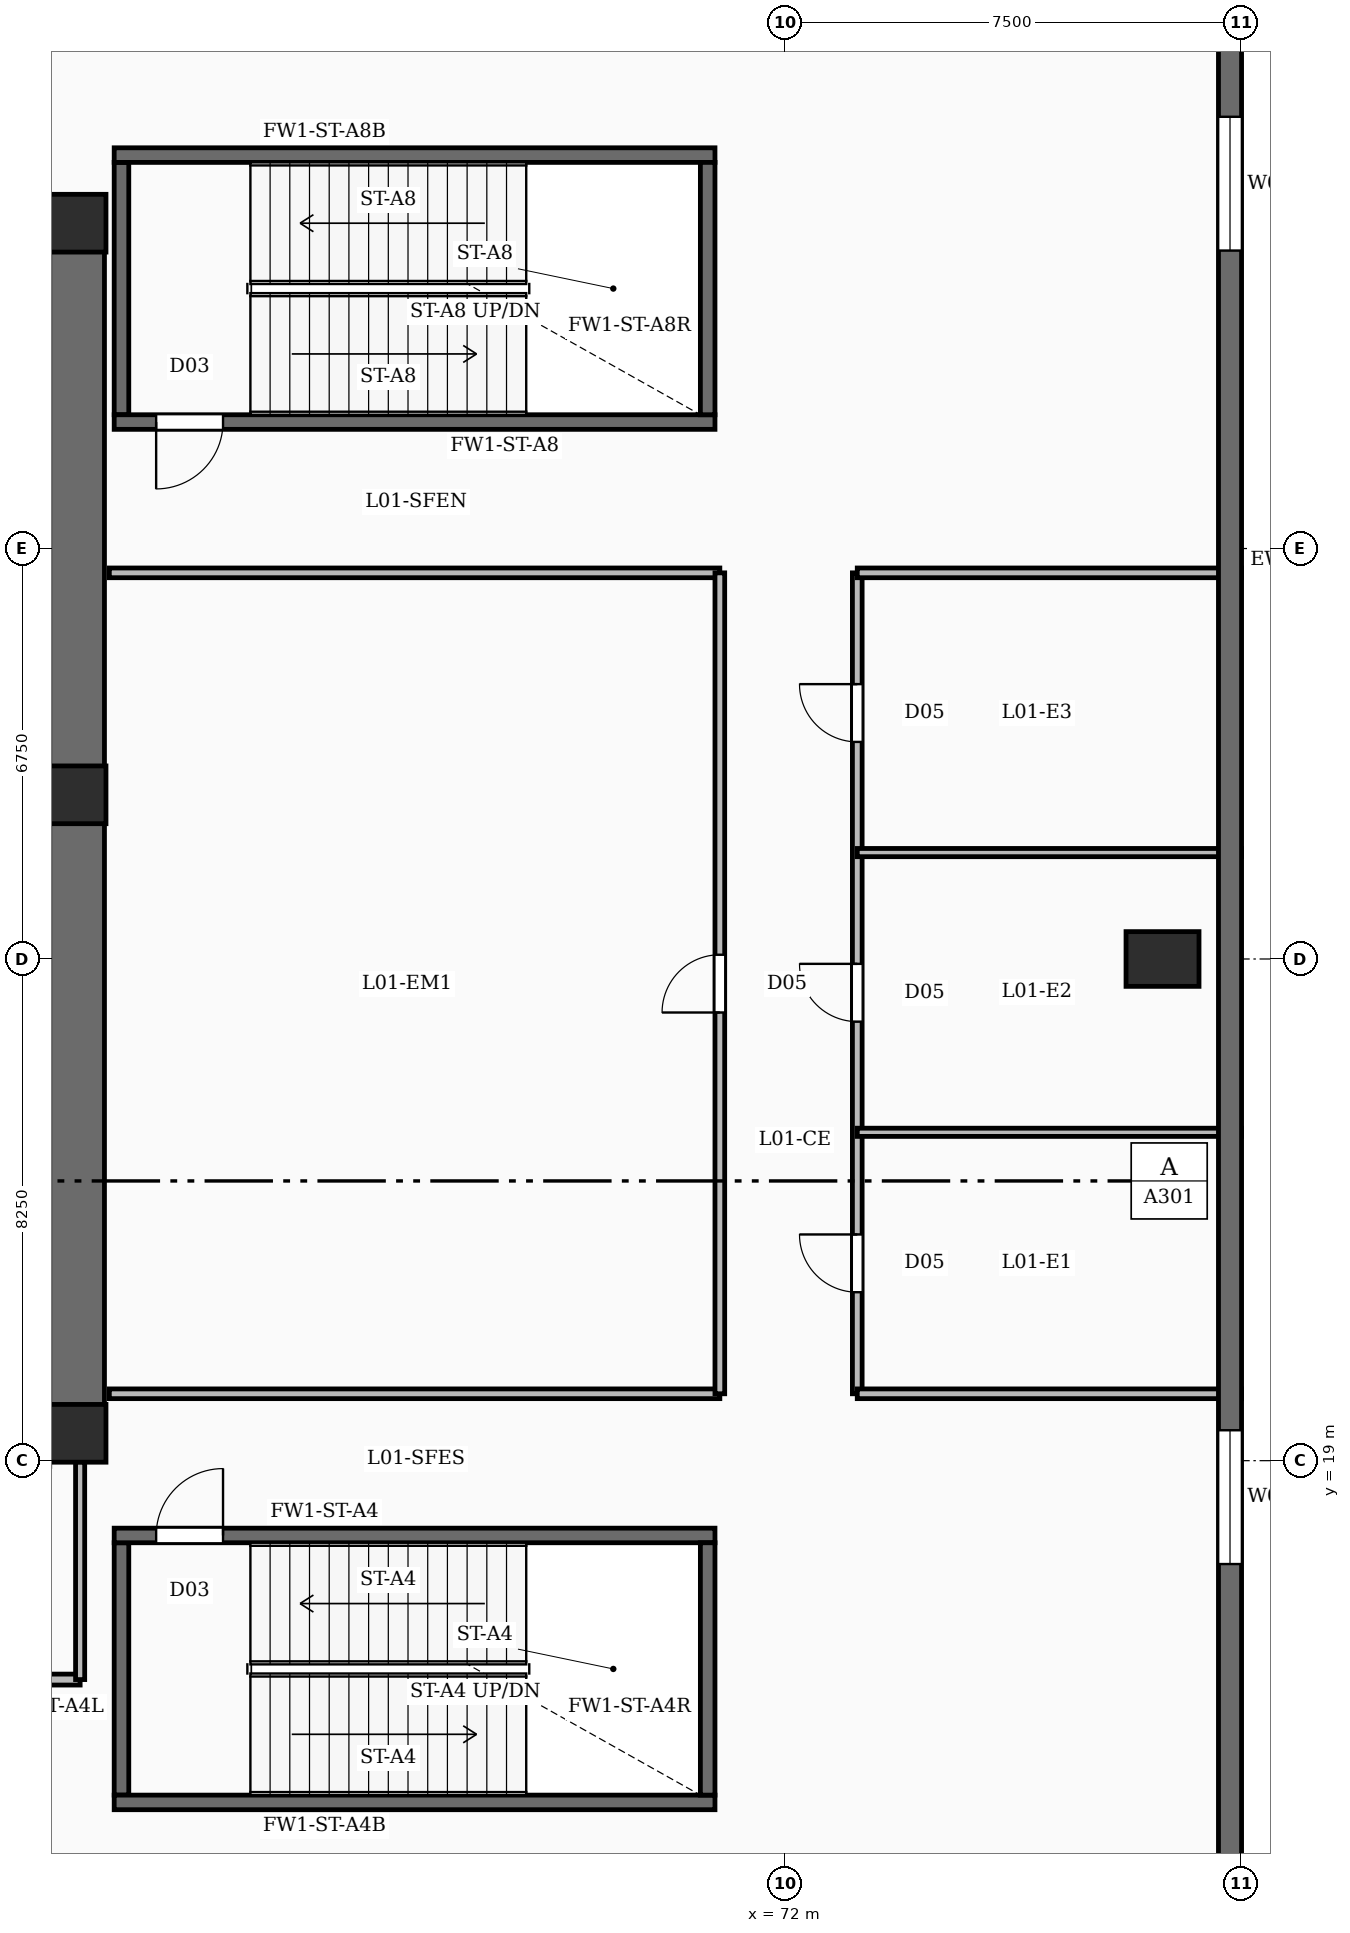
"""IFC4 building model, lengths in metres.
Left out: names, types, materials, properties, quantities, classifications, styles, units other than length and angle.
Written with IfcOpenShell. Run it as: python <this file> out.ifc"""

import sys

from ifc_helpers import new_model, si_unit, direction, frame, frame_2d, origin, origin_2d, place, context, subcontext, project, spatial, rectangle, extrude, element, fill, save


model = new_model("IFC4")
c1 = context("Model", 3, precision=1e-05, world=origin(), true_north=direction((0.0, 1.0)))
c2 = subcontext(c1, "Body", "Model", "MODEL_VIEW")
j1 = project(units=[si_unit("LENGTHUNIT", "METRE"), si_unit("PLANEANGLEUNIT", "RADIAN")], contexts=[c1])
p1 = place(None, origin())
s1 = spatial("IfcSite", under=j1, at=p1, CompositionType="ELEMENT")
p2 = place(p1, origin())
s2 = spatial("IfcBuilding", under=s1, at=p2, CompositionType="ELEMENT")
p3 = place(p2, frame((0.0, 0.0, 8.0)))
s3 = spatial("IfcBuildingStorey", under=s2, at=p3, CompositionType="ELEMENT", Elevation=8.0)
p4 = place(p3, frame((60.35, 19.0, -0.35), z_axis=(0.0, 0.0, 1.0), x_axis=(0.0, 1.0, 0.0)))
e1 = element("IfcWall", 1, at=p4, inside=s3, PredefinedType="SHEAR", context=c2, shape_type="SweptSolid", body=[
    extrude(rectangle(XDim=20.8, YDim=0.9, at=frame_2d((10.4, 0.0))), origin(), (0.0, 0.0, 1.0), 5.0),
])
for number, where, z_axis, x_axis in (
    (2, (60.35, 19.45, -0.35), (0.0, 0.0, 1.0), (1.0, 0.0, 0.0)),
    (3, (60.35, 29.95, -0.35), (0.0, 0.0, 1.0), (1.0, 0.0, 0.0)),
    (4, (60.35, 39.35, -0.35), (0.0, 0.0, 1.0), (1.0, 0.0, 0.0)),
):
    element("IfcColumn", number, at=place(p3, frame(where, z_axis=z_axis, x_axis=x_axis)), inside=s3, PredefinedType="COLUMN", context=c2, shape_type="SweptSolid", body=[
        extrude(rectangle(XDim=0.95, YDim=0.95, at=origin_2d()), origin(), (0.0, 0.0, 1.0), 5.0),
    ])
p5 = place(p3, frame((78.2, 27.25, -0.35), z_axis=(0.0, 0.0, 1.0), x_axis=(1.0, 0.0, 0.0)))
e5 = element("IfcColumn", 5, at=p5, inside=s3, PredefinedType="COLUMN", context=c2, shape_type="SweptSolid", body=[
    extrude(rectangle(XDim=1.2, YDim=0.9, at=origin_2d()), origin(), (0.0, 0.0, 1.0), 5.0),
])
p6 = place(p3, frame((79.31, 49.1, 0.0), z_axis=(0.0, 0.0, 1.0), x_axis=(0.0, -1.0, 0.0)))
e6 = element("IfcWall", 6, at=p6, inside=s3, PredefinedType="SOLIDWALL", context=c2, shape_type="SweptSolid", body=[
    extrude(rectangle(XDim=43.7, YDim=0.38, at=frame_2d((21.85, 0.0))), origin(), (0.0, 0.0, 1.0), 4.65),
])
p7 = place(p6, frame((2.6, 0.0, 0.95)))
e7 = element("IfcOpeningElement", 7, at=p7, cuts=e6, PredefinedType="OPENING", context=c2, shape_type="SweptSolid", body=[
    extrude(rectangle(XDim=2.2, YDim=2.5, at=frame_2d((1.1, 1.25))), frame((0.0, 0.2, 0.0), z_axis=(0.0, -1.0, 0.0), x_axis=(1.0, 0.0, 0.0)), (0.0, 0.0, 1.0), 0.4),
])
p8 = place(p6, frame((8.0, 0.0, 0.95)))
e8 = element("IfcOpeningElement", 8, at=p8, cuts=e6, PredefinedType="OPENING", context=c2, shape_type="SweptSolid", body=[
    extrude(rectangle(XDim=2.2, YDim=2.5, at=frame_2d((1.1, 1.25))), frame((0.0, 0.2, 0.0), z_axis=(0.0, -1.0, 0.0), x_axis=(1.0, 0.0, 0.0)), (0.0, 0.0, 1.0), 0.4),
])
p9 = place(p6, frame((29.6, 0.0, 0.95)))
e9 = element("IfcOpeningElement", 9, at=p9, cuts=e6, PredefinedType="OPENING", context=c2, shape_type="SweptSolid", body=[
    extrude(rectangle(XDim=2.2, YDim=2.5, at=frame_2d((1.1, 1.25))), frame((0.0, 0.2, 0.0), z_axis=(0.0, -1.0, 0.0), x_axis=(1.0, 0.0, 0.0)), (0.0, 0.0, 1.0), 0.4),
])
p10 = place(p3, frame((60.96, 17.77, 0.0), z_axis=(0.0, 0.0, 1.0), x_axis=(1.0, 0.0, 0.0)))
e10 = element("IfcWall", 10, at=p10, inside=s3, PredefinedType="SOLIDWALL", context=c2, shape_type="SweptSolid", body=[
    extrude(rectangle(XDim=9.88, YDim=0.24, at=frame_2d((4.94, 0.0))), origin(), (0.0, 0.0, 1.0), 4.65),
])
p11 = place(p10, frame((0.69, 0.0, 0.0)))
e11 = element("IfcOpeningElement", 11, at=p11, cuts=e10, PredefinedType="OPENING", context=c2, shape_type="SweptSolid", body=[
    extrude(rectangle(XDim=1.1, YDim=2.15, at=frame_2d((0.55, 1.075))), frame((0.0, 0.13, 0.0), z_axis=(0.0, -1.0, 0.0), x_axis=(1.0, 0.0, 0.0)), (0.0, 0.0, 1.0), 0.26),
])
p12 = place(p3, frame((60.96, 13.38, 0.0), z_axis=(0.0, 0.0, 1.0), x_axis=(1.0, 0.0, 0.0)))
e12 = element("IfcWall", 12, at=p12, inside=s3, PredefinedType="SOLIDWALL", context=c2, shape_type="SweptSolid", body=[
    extrude(rectangle(XDim=9.88, YDim=0.24, at=frame_2d((4.94, 0.0))), origin(), (0.0, 0.0, 1.0), 4.65),
])
for number, where, z_axis, x_axis in (
    (13, (61.08, 13.5, 0.0), (0.0, 0.0, 1.0), (0.0, 1.0, 0.0)),
    (14, (70.72, 13.5, 0.0), (0.0, 0.0, 1.0), (0.0, 1.0, 0.0)),
):
    element("IfcWall", number, at=place(p3, frame(where, z_axis=z_axis, x_axis=x_axis)), inside=s3, PredefinedType="SOLIDWALL", context=c2, shape_type="SweptSolid", body=[
        extrude(rectangle(XDim=4.15, YDim=0.24, at=frame_2d((2.075, 0.0))), origin(), (0.0, 0.0, 1.0), 4.65),
    ])
p13 = place(p3, frame((70.84, 36.08, 0.0), z_axis=(0.0, 0.0, 1.0), x_axis=(-1.0, 0.0, 0.0)))
e15 = element("IfcWall", 15, at=p13, inside=s3, PredefinedType="SOLIDWALL", context=c2, shape_type="SweptSolid", body=[
    extrude(rectangle(XDim=9.88, YDim=0.24, at=frame_2d((4.94, 0.0))), origin(), (0.0, 0.0, 1.0), 4.65),
])
p14 = place(p13, frame((8.09, 0.0, 0.0)))
e16 = element("IfcOpeningElement", 16, at=p14, cuts=e15, PredefinedType="OPENING", context=c2, shape_type="SweptSolid", body=[
    extrude(rectangle(XDim=1.1, YDim=2.15, at=frame_2d((0.55, 1.075))), frame((0.0, 0.13, 0.0), z_axis=(0.0, -1.0, 0.0), x_axis=(1.0, 0.0, 0.0)), (0.0, 0.0, 1.0), 0.26),
])
p15 = place(p3, frame((60.96, 40.47, 0.0), z_axis=(0.0, 0.0, 1.0), x_axis=(1.0, 0.0, 0.0)))
e17 = element("IfcWall", 17, at=p15, inside=s3, PredefinedType="SOLIDWALL", context=c2, shape_type="SweptSolid", body=[
    extrude(rectangle(XDim=9.88, YDim=0.24, at=frame_2d((4.94, 0.0))), origin(), (0.0, 0.0, 1.0), 4.65),
])
for number, where, z_axis, x_axis in (
    (18, (61.08, 36.2, 0.0), (0.0, 0.0, 1.0), (0.0, 1.0, 0.0)),
    (19, (70.72, 36.2, 0.0), (0.0, 0.0, 1.0), (0.0, 1.0, 0.0)),
):
    element("IfcWall", number, at=place(p3, frame(where, z_axis=z_axis, x_axis=x_axis)), inside=s3, PredefinedType="SOLIDWALL", context=c2, shape_type="SweptSolid", body=[
        extrude(rectangle(XDim=4.15, YDim=0.24, at=frame_2d((2.075, 0.0))), origin(), (0.0, 0.0, 1.0), 4.65),
    ])
p16 = place(p3, frame((50.4, 15.4, 0.0), z_axis=(0.0, 0.0, 1.0), x_axis=(1.0, 0.0, 0.0)))
e20 = element("IfcWall", 20, at=p16, inside=s3, PredefinedType="SOLIDWALL", context=c2, shape_type="SweptSolid", body=[
    extrude(rectangle(XDim=10.0, YDim=0.18, at=frame_2d((5.0, 0.0))), origin(), (0.0, 0.0, 1.0), 3.71),
])
p17 = place(p16, frame((1.94, 0.0, 0.0)))
e21 = element("IfcOpeningElement", 21, at=p17, cuts=e20, PredefinedType="OPENING", context=c2, shape_type="SweptSolid", body=[
    extrude(rectangle(XDim=0.92, YDim=2.1, at=frame_2d((0.46, 1.05))), frame((0.0, 0.1, 0.0), z_axis=(0.0, -1.0, 0.0), x_axis=(1.0, 0.0, 0.0)), (0.0, 0.0, 1.0), 0.2),
])
p18 = place(p16, frame((6.97, 0.0, 0.0)))
e22 = element("IfcOpeningElement", 22, at=p18, cuts=e20, PredefinedType="OPENING", context=c2, shape_type="SweptSolid", body=[
    extrude(rectangle(XDim=0.86, YDim=2.05, at=frame_2d((0.43, 1.025))), frame((0.0, 0.1, 0.0), z_axis=(0.0, -1.0, 0.0), x_axis=(1.0, 0.0, 0.0)), (0.0, 0.0, 1.0), 0.2),
])
p19 = place(p3, frame((60.4, 15.4, 0.0), z_axis=(0.0, 0.0, 1.0), x_axis=(0.0, 1.0, 0.0)))
e23 = element("IfcWall", 23, at=p19, inside=s3, PredefinedType="PARTITIONING", context=c2, shape_type="SweptSolid", body=[
    extrude(rectangle(XDim=3.58, YDim=0.15, at=frame_2d((1.79, 0.0))), origin(), (0.0, 0.0, 1.0), 3.71),
])
for number, where, z_axis, x_axis in (
    (24, (73.18, 24.4, 0.0), (0.0, 0.0, 1.0), (1.0, 0.0, 0.0)),
    (25, (73.18, 29.0, 0.0), (0.0, 0.0, 1.0), (1.0, 0.0, 0.0)),
):
    element("IfcWall", number, at=place(p3, frame(where, z_axis=z_axis, x_axis=x_axis)), inside=s3, PredefinedType="PARTITIONING", context=c2, shape_type="SweptSolid", body=[
        extrude(rectangle(XDim=6.32, YDim=0.135, at=frame_2d((3.16, 0.0))), origin(), (0.0, 0.0, 1.0), 3.71),
    ])
p20 = place(p3, frame((70.92, 20.1, 0.0), z_axis=(0.0, 0.0, 1.0), x_axis=(0.0, 1.0, 0.0)))
e26 = element("IfcWall", 26, at=p20, inside=s3, PredefinedType="PARTITIONING", context=c2, shape_type="SweptSolid", body=[
    extrude(rectangle(XDim=13.5, YDim=0.16, at=frame_2d((6.75, 0.0))), origin(), (0.0, 0.0, 1.0), 3.71),
])
p21 = place(p20, frame((6.27, 0.0, 0.0)))
e27 = element("IfcOpeningElement", 27, at=p21, cuts=e26, PredefinedType="OPENING", context=c2, shape_type="SweptSolid", body=[
    extrude(rectangle(XDim=0.95, YDim=2.15, at=frame_2d((0.475, 1.075))), frame((0.0, 0.09, 0.0), z_axis=(0.0, -1.0, 0.0), x_axis=(1.0, 0.0, 0.0)), (0.0, 0.0, 1.0), 0.18),
])
p22 = place(p3, frame((73.18, 20.1, 0.0), z_axis=(0.0, 0.0, 1.0), x_axis=(0.0, 1.0, 0.0)))
e28 = element("IfcWall", 28, at=p22, inside=s3, PredefinedType="PARTITIONING", context=c2, shape_type="SweptSolid", body=[
    extrude(rectangle(XDim=13.5, YDim=0.16, at=frame_2d((6.75, 0.0))), origin(), (0.0, 0.0, 1.0), 3.71),
])
p23 = place(p22, frame((1.67, 0.0, 0.0)))
e29 = element("IfcOpeningElement", 29, at=p23, cuts=e28, PredefinedType="OPENING", context=c2, shape_type="SweptSolid", body=[
    extrude(rectangle(XDim=0.95, YDim=2.15, at=frame_2d((0.475, 1.075))), frame((0.0, 0.09, 0.0), z_axis=(0.0, -1.0, 0.0), x_axis=(1.0, 0.0, 0.0)), (0.0, 0.0, 1.0), 0.18),
])
p24 = place(p22, frame((6.12, 0.0, 0.0)))
e30 = element("IfcOpeningElement", 30, at=p24, cuts=e28, PredefinedType="OPENING", context=c2, shape_type="SweptSolid", body=[
    extrude(rectangle(XDim=0.95, YDim=2.15, at=frame_2d((0.475, 1.075))), frame((0.0, 0.09, 0.0), z_axis=(0.0, -1.0, 0.0), x_axis=(1.0, 0.0, 0.0)), (0.0, 0.0, 1.0), 0.18),
])
p25 = place(p22, frame((10.72, 0.0, 0.0)))
e31 = element("IfcOpeningElement", 31, at=p25, cuts=e28, PredefinedType="OPENING", context=c2, shape_type="SweptSolid", body=[
    extrude(rectangle(XDim=0.95, YDim=2.15, at=frame_2d((0.475, 1.075))), frame((0.0, 0.09, 0.0), z_axis=(0.0, -1.0, 0.0), x_axis=(1.0, 0.0, 0.0)), (0.0, 0.0, 1.0), 0.18),
])
for number, where, z_axis, x_axis in (
    (32, (60.88, 20.1, 0.0), (0.0, 0.0, 1.0), (1.0, 0.0, 0.0)),
    (33, (60.88, 33.6, 0.0), (0.0, 0.0, 1.0), (1.0, 0.0, 0.0)),
):
    element("IfcWall", number, at=place(p3, frame(where, z_axis=z_axis, x_axis=x_axis)), inside=s3, PredefinedType="PARTITIONING", context=c2, shape_type="SweptSolid", body=[
        extrude(rectangle(XDim=10.04, YDim=0.16, at=frame_2d((5.02, 0.0))), origin(), (0.0, 0.0, 1.0), 3.71),
    ])
for number, where, z_axis, x_axis in (
    (34, (73.18, 20.1, 0.0), (0.0, 0.0, 1.0), (1.0, 0.0, 0.0)),
    (35, (73.18, 33.6, 0.0), (0.0, 0.0, 1.0), (1.0, 0.0, 0.0)),
):
    element("IfcWall", number, at=place(p3, frame(where, z_axis=z_axis, x_axis=x_axis)), inside=s3, PredefinedType="PARTITIONING", context=c2, shape_type="SweptSolid", body=[
        extrude(rectangle(XDim=6.32, YDim=0.16, at=frame_2d((3.16, 0.0))), origin(), (0.0, 0.0, 1.0), 3.71),
    ])
p26 = place(p8, origin())
e36 = element("IfcWindow", 36, at=p26, inside=s3, PartitioningType="DOUBLE_PANEL_VERTICAL", PredefinedType="WINDOW", context=c2, shape_type="SweptSolid", body=[
    extrude(rectangle(XDim=2.2, YDim=2.5, at=frame_2d((1.1, 1.25))), frame((0.0, 0.03, 0.0), z_axis=(0.0, -1.0, 0.0), x_axis=(1.0, 0.0, 0.0)), (0.0, 0.0, 1.0), 0.06),
])
fill(e8, e36)
p27 = place(p9, origin())
e37 = element("IfcWindow", 37, at=p27, inside=s3, PartitioningType="DOUBLE_PANEL_VERTICAL", PredefinedType="WINDOW", context=c2, shape_type="SweptSolid", body=[
    extrude(rectangle(XDim=2.2, YDim=2.5, at=frame_2d((1.1, 1.25))), frame((0.0, 0.03, 0.0), z_axis=(0.0, -1.0, 0.0), x_axis=(1.0, 0.0, 0.0)), (0.0, 0.0, 1.0), 0.06),
])
fill(e9, e37)
p28 = place(p11, origin())
e38 = element("IfcDoor", 38, at=p28, inside=s3, OperationType="SINGLE_SWING_RIGHT", PredefinedType="DOOR", context=c2, shape_type="SweptSolid", body=[
    extrude(rectangle(XDim=1.1, YDim=2.15, at=frame_2d((0.55, 1.075))), frame((0.0, 0.025, 0.0), z_axis=(0.0, -1.0, 0.0), x_axis=(1.0, 0.0, 0.0)), (0.0, 0.0, 1.0), 0.05),
])
fill(e11, e38)
p29 = place(p14, origin())
e39 = element("IfcDoor", 39, at=p29, inside=s3, OperationType="SINGLE_SWING_RIGHT", PredefinedType="DOOR", context=c2, shape_type="SweptSolid", body=[
    extrude(rectangle(XDim=1.1, YDim=2.15, at=frame_2d((0.55, 1.075))), frame((0.0, 0.025, 0.0), z_axis=(0.0, -1.0, 0.0), x_axis=(1.0, 0.0, 0.0)), (0.0, 0.0, 1.0), 0.05),
])
fill(e16, e39)
p30 = place(p21, origin())
e40 = element("IfcDoor", 40, at=p30, inside=s3, OperationType="SINGLE_SWING_LEFT", PredefinedType="DOOR", context=c2, shape_type="SweptSolid", body=[
    extrude(rectangle(XDim=0.95, YDim=2.15, at=frame_2d((0.475, 1.075))), frame((0.0, 0.025, 0.0), z_axis=(0.0, -1.0, 0.0), x_axis=(1.0, 0.0, 0.0)), (0.0, 0.0, 1.0), 0.05),
])
fill(e27, e40)
p31 = place(p23, origin())
e41 = element("IfcDoor", 41, at=p31, inside=s3, OperationType="SINGLE_SWING_RIGHT", PredefinedType="DOOR", context=c2, shape_type="SweptSolid", body=[
    extrude(rectangle(XDim=0.95, YDim=2.15, at=frame_2d((0.475, 1.075))), frame((0.0, 0.025, 0.0), z_axis=(0.0, -1.0, 0.0), x_axis=(1.0, 0.0, 0.0)), (0.0, 0.0, 1.0), 0.05),
])
fill(e29, e41)
p32 = place(p24, origin())
e42 = element("IfcDoor", 42, at=p32, inside=s3, OperationType="SINGLE_SWING_RIGHT", PredefinedType="DOOR", context=c2, shape_type="SweptSolid", body=[
    extrude(rectangle(XDim=0.95, YDim=2.15, at=frame_2d((0.475, 1.075))), frame((0.0, 0.025, 0.0), z_axis=(0.0, -1.0, 0.0), x_axis=(1.0, 0.0, 0.0)), (0.0, 0.0, 1.0), 0.05),
])
fill(e30, e42)
p33 = place(p25, origin())
e43 = element("IfcDoor", 43, at=p33, inside=s3, OperationType="SINGLE_SWING_RIGHT", PredefinedType="DOOR", context=c2, shape_type="SweptSolid", body=[
    extrude(rectangle(XDim=0.95, YDim=2.15, at=frame_2d((0.475, 1.075))), frame((0.0, 0.025, 0.0), z_axis=(0.0, -1.0, 0.0), x_axis=(1.0, 0.0, 0.0)), (0.0, 0.0, 1.0), 0.05),
])
fill(e31, e43)
save(model, sys.argv[1])
